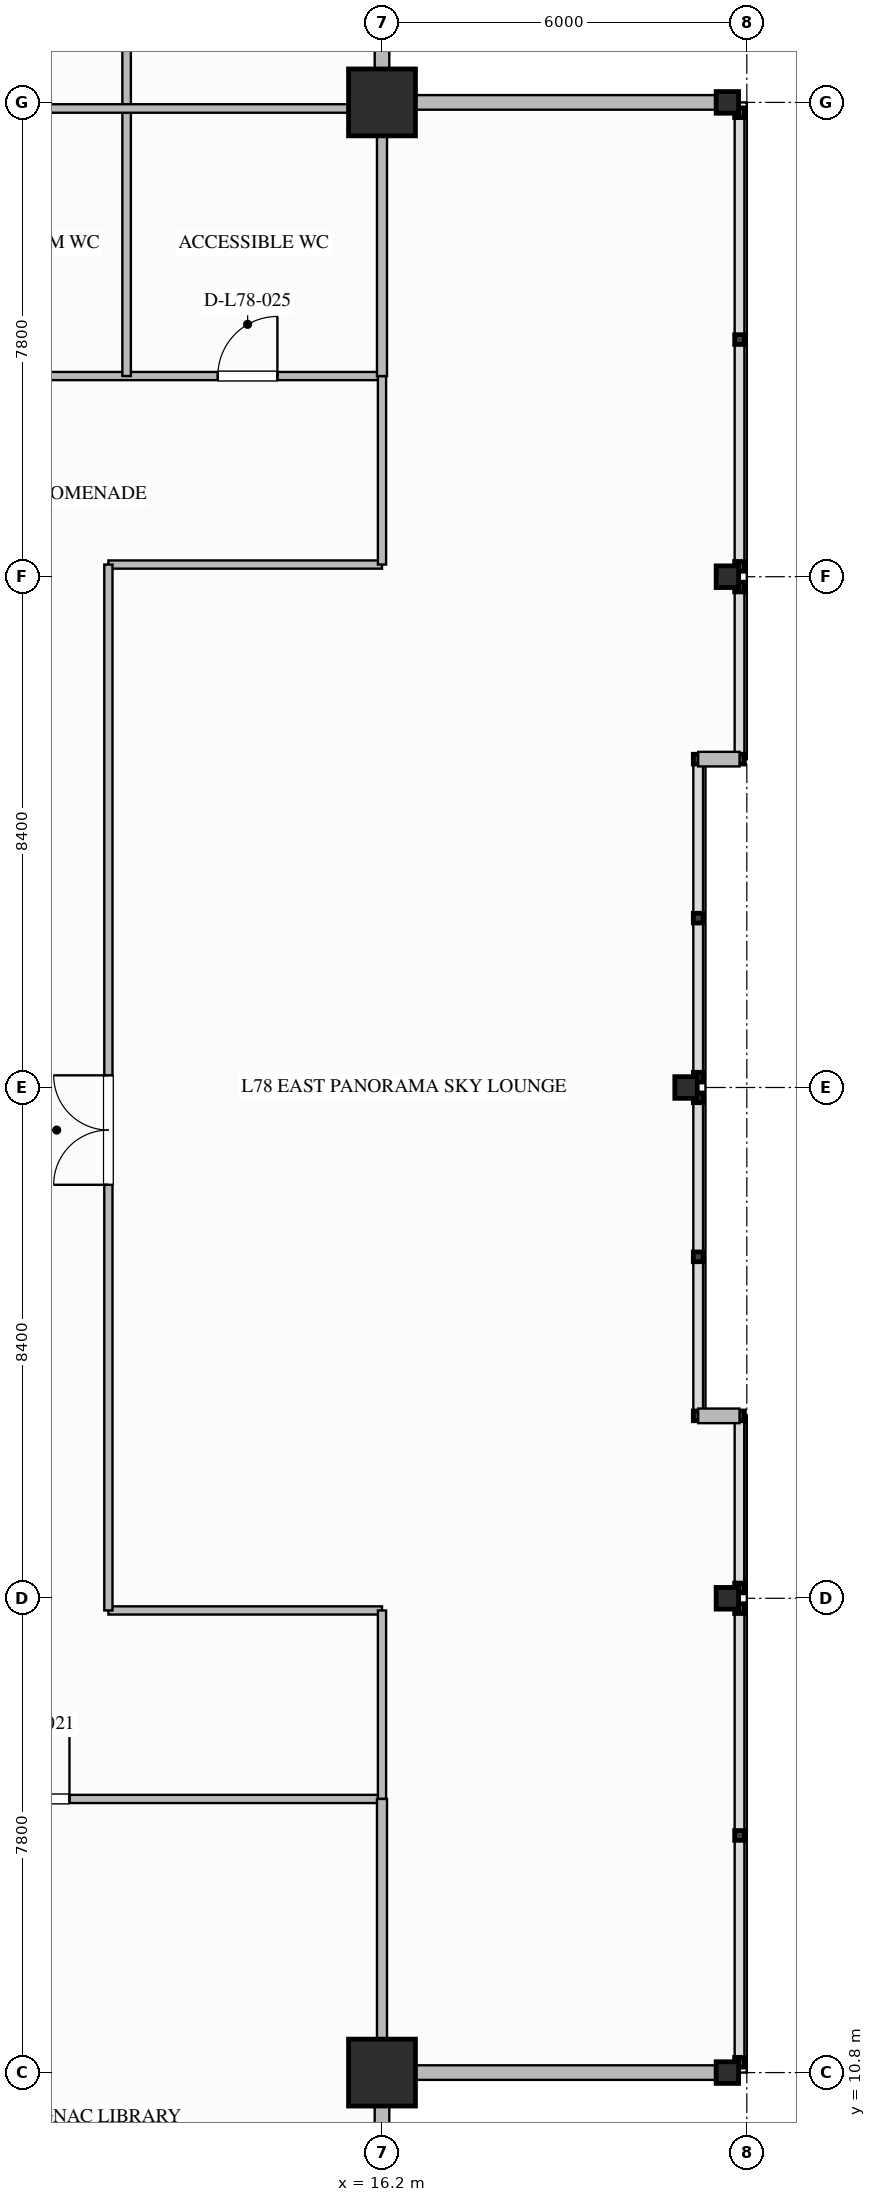
"""IFC4 building model, lengths in metres.
Left out: names, types, materials, properties, quantities, classifications, styles, units other than length and angle.
Written with IfcOpenShell. Run it as: python <this file> out.ifc"""

import sys

from ifc_helpers import new_model, si_unit, direction, frame, frame_2d, origin, origin_2d, place, context, subcontext, project, spatial, rectangle, i_section, extrude, element, fill, save


model = new_model("IFC4")
c1 = context("Model", 3, precision=1e-05, world=origin(), true_north=direction((0.0, 1.0)))
c2 = subcontext(c1, "Body", "Model", "MODEL_VIEW")
j1 = project(units=[si_unit("LENGTHUNIT", "METRE"), si_unit("PLANEANGLEUNIT", "RADIAN")], contexts=[c1])
p1 = place(None, origin())
s1 = spatial("IfcSite", under=j1, at=p1, CompositionType="ELEMENT")
p2 = place(p1, origin())
s2 = spatial("IfcBuilding", under=s1, at=p2, CompositionType="ELEMENT")
p3 = place(p2, frame((0.0, 0.0, 298.6)))
s3 = spatial("IfcBuildingStorey", under=s2, at=p3, CompositionType="ELEMENT", Elevation=298.6)
for number, where, z_axis, x_axis in (
    (1, (16.2, 10.8, 0.0), (0.0, 0.0, 1.0), (1.0, 0.0, 0.0)),
    (2, (16.2, 43.2, 0.0), (0.0, 0.0, 1.0), (1.0, 0.0, 0.0)),
):
    element("IfcColumn", number, at=place(p3, frame(where, z_axis=z_axis, x_axis=x_axis)), inside=s3, PredefinedType="COLUMN", context=c2, shape_type="SweptSolid", body=[
        extrude(rectangle(XDim=1.1, YDim=1.1, at=origin_2d()), origin(), (0.0, 0.0, 1.0), 4.4),
    ])
for number, where, z_axis, x_axis in (
    (3, (21.88, 10.8, 0.0), (0.0, 0.0, 1.0), (1.0, 0.0, 0.0)),
    (4, (21.88, 18.6, 0.0), (0.0, 0.0, 1.0), (1.0, 0.0, 0.0)),
    (5, (21.2, 27.0, 0.0), (0.0, 0.0, 1.0), (1.0, 0.0, 0.0)),
    (6, (21.88, 35.4, 0.0), (0.0, 0.0, 1.0), (1.0, 0.0, 0.0)),
    (7, (21.88, 43.2, 0.0), (0.0, 0.0, 1.0), (1.0, 0.0, 0.0)),
):
    element("IfcColumn", number, at=place(p3, frame(where, z_axis=z_axis, x_axis=x_axis)), inside=s3, PredefinedType="COLUMN", context=c2, shape_type="SweptSolid", body=[
        extrude(i_section(OverallWidth=0.369, OverallDepth=0.356, WebThickness=0.011, FlangeThickness=0.018, FilletRadius=0.025, at=origin_2d()), origin(), (0.0, 0.0, 1.0), 4.397),
    ])
for number, where, z_axis, x_axis in (
    (8, (16.2, 49.08, 0.0), (0.0, 0.0, 1.0), (0.0, -1.0, 0.0)),
    (9, (16.2, 43.2, 0.0), (0.0, 0.0, 1.0), (1.0, 0.0, 0.0)),
    (10, (22.08, 10.8, 0.0), (0.0, 0.0, 1.0), (-1.0, 0.0, 0.0)),
    (11, (16.2, 10.8, 0.0), (0.0, 0.0, 1.0), (0.0, -1.0, 0.0)),
):
    element("IfcWall", number, at=place(p3, frame(where, z_axis=z_axis, x_axis=x_axis)), inside=s3, PredefinedType="STANDARD", context=c2, shape_type="SweptSolid", body=[
        extrude(rectangle(XDim=5.88, YDim=0.24, at=frame_2d((2.94, 0.0))), origin(), (0.0, 0.0, 1.0), 3.439),
    ])
for number, where, z_axis, x_axis in (
    (12, (22.08, 32.4, 0.0), (0.0, 0.0, 1.0), (-1.0, 0.0, 0.0)),
    (13, (21.4, 21.6, 0.0), (0.0, 0.0, 1.0), (1.0, 0.0, 0.0)),
):
    element("IfcWall", number, at=place(p3, frame(where, z_axis=z_axis, x_axis=x_axis)), inside=s3, PredefinedType="STANDARD", context=c2, shape_type="SweptSolid", body=[
        extrude(rectangle(XDim=0.68, YDim=0.24, at=frame_2d((0.34, 0.0))), origin(), (0.0, 0.0, 1.0), 4.05),
    ])
p4 = place(p3, frame((-16.2, 15.3, 0.0), z_axis=(0.0, 0.0, 1.0), x_axis=(1.0, 0.0, 0.0)))
e14 = element("IfcWall", 14, at=p4, inside=s3, PredefinedType="PARTITIONING", context=c2, shape_type="SweptSolid", body=[
    extrude(rectangle(XDim=32.4, YDim=0.135, at=frame_2d((16.2, 0.0))), origin(), (0.0, 0.0, 1.0), 4.05),
])
p5 = place(p4, frame((4.0, 0.0, 0.0)))
e15 = element("IfcOpeningElement", 15, at=p5, cuts=e14, PredefinedType="OPENING", context=c2, shape_type="SweptSolid", body=[
    extrude(rectangle(XDim=1.26, YDim=2.2, at=frame_2d((0.63, 1.1))), frame((0.0, 0.077, 0.0), z_axis=(0.0, -1.0, 0.0), x_axis=(1.0, 0.0, 0.0)), (0.0, 0.0, 1.0), 0.155),
])
p6 = place(p4, frame((15.5, 0.0, 0.0)))
e16 = element("IfcOpeningElement", 16, at=p6, cuts=e14, PredefinedType="OPENING", context=c2, shape_type="SweptSolid", body=[
    extrude(rectangle(XDim=1.26, YDim=2.2, at=frame_2d((0.63, 1.1))), frame((0.0, 0.077, 0.0), z_axis=(0.0, -1.0, 0.0), x_axis=(1.0, 0.0, 0.0)), (0.0, 0.0, 1.0), 0.155),
])
p7 = place(p4, frame((26.0, 0.0, 0.0)))
e17 = element("IfcOpeningElement", 17, at=p7, cuts=e14, PredefinedType="OPENING", context=c2, shape_type="SweptSolid", body=[
    extrude(rectangle(XDim=1.26, YDim=2.2, at=frame_2d((0.63, 1.1))), frame((0.0, 0.077, 0.0), z_axis=(0.0, -1.0, 0.0), x_axis=(1.0, 0.0, 0.0)), (0.0, 0.0, 1.0), 0.155),
])
p8 = place(p3, frame((-16.2, 38.7, 0.0), z_axis=(0.0, 0.0, 1.0), x_axis=(1.0, 0.0, 0.0)))
e18 = element("IfcWall", 18, at=p8, inside=s3, PredefinedType="PARTITIONING", context=c2, shape_type="SweptSolid", body=[
    extrude(rectangle(XDim=32.4, YDim=0.135, at=frame_2d((16.2, 0.0))), origin(), (0.0, 0.0, 1.0), 4.05),
])
p9 = place(p8, frame((4.0, 0.0, 0.0)))
e19 = element("IfcOpeningElement", 19, at=p9, cuts=e18, PredefinedType="OPENING", context=c2, shape_type="SweptSolid", body=[
    extrude(rectangle(XDim=1.26, YDim=2.2, at=frame_2d((0.63, 1.1))), frame((0.0, 0.077, 0.0), z_axis=(0.0, -1.0, 0.0), x_axis=(1.0, 0.0, 0.0)), (0.0, 0.0, 1.0), 0.155),
])
p10 = place(p8, frame((13.9, 0.0, 0.0)))
e20 = element("IfcOpeningElement", 20, at=p10, cuts=e18, PredefinedType="OPENING", context=c2, shape_type="SweptSolid", body=[
    extrude(rectangle(XDim=1.26, YDim=2.2, at=frame_2d((0.63, 1.1))), frame((0.0, 0.077, 0.0), z_axis=(0.0, -1.0, 0.0), x_axis=(1.0, 0.0, 0.0)), (0.0, 0.0, 1.0), 0.155),
])
p11 = place(p8, frame((25.5, 0.0, 0.0)))
e21 = element("IfcOpeningElement", 21, at=p11, cuts=e18, PredefinedType="OPENING", context=c2, shape_type="SweptSolid", body=[
    extrude(rectangle(XDim=0.92, YDim=2.1, at=frame_2d((0.46, 1.05))), frame((0.0, 0.077, 0.0), z_axis=(0.0, -1.0, 0.0), x_axis=(1.0, 0.0, 0.0)), (0.0, 0.0, 1.0), 0.155),
])
p12 = place(p8, frame((29.7, 0.0, 0.0)))
e22 = element("IfcOpeningElement", 22, at=p12, cuts=e18, PredefinedType="OPENING", context=c2, shape_type="SweptSolid", body=[
    extrude(rectangle(XDim=0.98, YDim=2.1, at=frame_2d((0.49, 1.05))), frame((0.0, 0.077, 0.0), z_axis=(0.0, -1.0, 0.0), x_axis=(1.0, 0.0, 0.0)), (0.0, 0.0, 1.0), 0.155),
])
for number, where, z_axis, x_axis in (
    (23, (11.7, 18.4, 0.0), (0.0, 0.0, 1.0), (1.0, 0.0, 0.0)),
    (24, (11.7, 35.6, 0.0), (0.0, 0.0, 1.0), (1.0, 0.0, 0.0)),
):
    element("IfcWall", number, at=place(p3, frame(where, z_axis=z_axis, x_axis=x_axis)), inside=s3, PredefinedType="PARTITIONING", context=c2, shape_type="SweptSolid", body=[
        extrude(rectangle(XDim=4.5, YDim=0.135, at=frame_2d((2.25, 0.0))), origin(), (0.0, 0.0, 1.0), 3.427),
    ])
p13 = place(p3, frame((11.7, 18.4, 0.0), z_axis=(0.0, 0.0, 1.0), x_axis=(0.0, 1.0, 0.0)))
e25 = element("IfcWall", 25, at=p13, inside=s3, PredefinedType="PARTITIONING", context=c2, shape_type="SweptSolid", body=[
    extrude(rectangle(XDim=17.2, YDim=0.135, at=frame_2d((8.6, 0.0))), origin(), (0.0, 0.0, 1.0), 4.05),
])
p14 = place(p13, frame((7.0, 0.0, 0.0)))
e26 = element("IfcOpeningElement", 26, at=p14, cuts=e25, PredefinedType="OPENING", context=c2, shape_type="SweptSolid", body=[
    extrude(rectangle(XDim=1.8, YDim=2.35, at=frame_2d((0.9, 1.175))), frame((0.0, 0.077, 0.0), z_axis=(0.0, -1.0, 0.0), x_axis=(1.0, 0.0, 0.0)), (0.0, 0.0, 1.0), 0.155),
])
for number, where, z_axis, x_axis in (
    (27, (16.2, 15.3, 0.0), (0.0, 0.0, 1.0), (0.0, 1.0, 0.0)),
    (28, (16.2, 35.6, 0.0), (0.0, 0.0, 1.0), (0.0, 1.0, 0.0)),
):
    element("IfcWall", number, at=place(p3, frame(where, z_axis=z_axis, x_axis=x_axis)), inside=s3, PredefinedType="PARTITIONING", context=c2, shape_type="SweptSolid", body=[
        extrude(rectangle(XDim=3.1, YDim=0.135, at=frame_2d((1.55, 0.0))), origin(), (0.0, 0.0, 1.0), 3.424),
    ])
for number, where, z_axis, x_axis in (
    (29, (16.2, 10.92, 0.0), (0.0, 0.0, 1.0), (0.0, 1.0, 0.0)),
    (30, (16.2, 38.7, 0.0), (0.0, 0.0, 1.0), (0.0, 1.0, 0.0)),
):
    element("IfcWall", number, at=place(p3, frame(where, z_axis=z_axis, x_axis=x_axis)), inside=s3, PredefinedType="PARTITIONING", context=c2, shape_type="SweptSolid", body=[
        extrude(rectangle(XDim=4.38, YDim=0.165, at=frame_2d((2.19, 0.0))), origin(), (0.0, 0.0, 1.0), 3.424),
    ])
p15 = place(p3, frame((12.0, 38.7, 0.0), z_axis=(0.0, 0.0, 1.0), x_axis=(0.0, 1.0, 0.0)))
e31 = element("IfcWall", 31, at=p15, inside=s3, PredefinedType="PLUMBINGWALL", context=c2, shape_type="SweptSolid", body=[
    extrude(rectangle(XDim=10.38, YDim=0.14, at=frame_2d((5.19, 0.0))), origin(), (0.0, 0.0, 1.0), 4.05),
])
p16 = place(p3, frame((7.6, 43.1, 0.0), z_axis=(0.0, 0.0, 1.0), x_axis=(1.0, 0.0, 0.0)))
e32 = element("IfcWall", 32, at=p16, inside=s3, PredefinedType="PLUMBINGWALL", context=c2, shape_type="SweptSolid", body=[
    extrude(rectangle(XDim=8.6, YDim=0.14, at=frame_2d((4.3, 0.0))), origin(), (0.0, 0.0, 1.0), 3.424),
])
p17 = place(p7, origin())
e33 = element("IfcDoor", 33, at=p17, inside=s3, OperationType="SINGLE_SWING_RIGHT", PredefinedType="DOOR", context=c2, shape_type="SweptSolid", body=[
    extrude(rectangle(XDim=1.26, YDim=2.2, at=frame_2d((0.63, 1.1))), frame((0.0, 0.025, 0.0), z_axis=(0.0, -1.0, 0.0), x_axis=(1.0, 0.0, 0.0)), (0.0, 0.0, 1.0), 0.05),
])
fill(e17, e33)
p18 = place(p12, origin())
e34 = element("IfcDoor", 34, at=p18, inside=s3, OperationType="SINGLE_SWING_RIGHT", PredefinedType="DOOR", context=c2, shape_type="SweptSolid", body=[
    extrude(rectangle(XDim=0.98, YDim=2.1, at=frame_2d((0.49, 1.05))), frame((0.0, 0.025, 0.0), z_axis=(0.0, -1.0, 0.0), x_axis=(1.0, 0.0, 0.0)), (0.0, 0.0, 1.0), 0.05),
])
fill(e22, e34)
p19 = place(p14, origin())
e35 = element("IfcDoor", 35, at=p19, inside=s3, OperationType="DOUBLE_DOOR_SINGLE_SWING", PredefinedType="DOOR", context=c2, shape_type="SweptSolid", body=[
    extrude(rectangle(XDim=1.8, YDim=2.35, at=frame_2d((0.9, 1.175))), frame((0.0, 0.025, 0.0), z_axis=(0.0, -1.0, 0.0), x_axis=(1.0, 0.0, 0.0)), (0.0, 0.0, 1.0), 0.05),
])
fill(e26, e35)
save(model, sys.argv[1])
